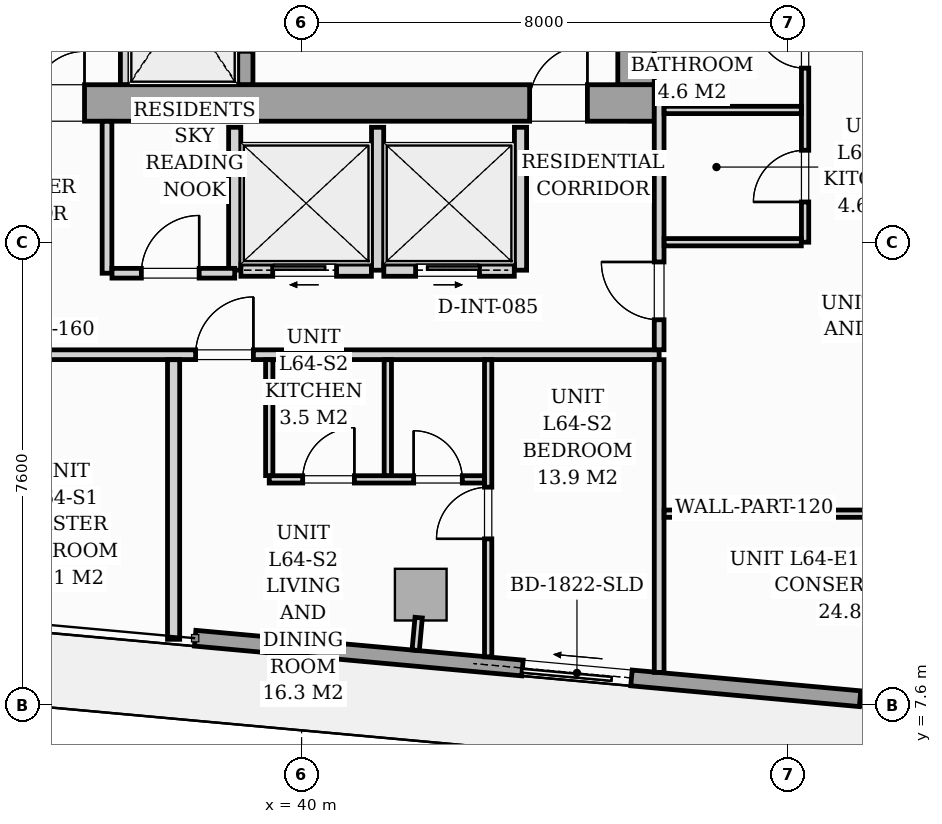
"""IFC4 building model, lengths in metres.
Left out: names, types, materials, properties, quantities, classifications, styles, units other than length and angle.
Written with IfcOpenShell. Run it as: python <this file> out.ifc"""

import sys

from ifc_helpers import new_model, si_unit, direction, frame, frame_2d, origin, origin_2d, place, context, subcontext, project, spatial, rectangle, i_section, extrude, source, transform, mapped, element, fill, save


model = new_model("IFC4")
c1 = context("Model", 3, precision=1e-05, world=origin(), true_north=direction((0.0, 1.0)))
c2 = subcontext(c1, "Body", "Model", "MODEL_VIEW")
j1 = project(units=[si_unit("LENGTHUNIT", "METRE"), si_unit("PLANEANGLEUNIT", "RADIAN")], contexts=[c1])
p1 = place(None, origin())
s1 = spatial("IfcSite", under=j1, at=p1, CompositionType="ELEMENT")
p2 = place(p1, origin())
s2 = spatial("IfcBuilding", under=s1, at=p2, CompositionType="ELEMENT")
p3 = place(p2, frame((0.0, 0.0, 223.2)))
s3 = spatial("IfcBuildingStorey", under=s2, at=p3, CompositionType="ELEMENT", Elevation=223.2)
m1 = source(origin(), c2, "Body", "SweptSolid", [
    extrude(i_section(OverallWidth=0.409, OverallDepth=0.425, WebThickness=0.033, FlangeThickness=0.052, FilletRadius=0.018, at=origin_2d()), origin(), (0.0, 0.0, 1.0), 3.296),
])
for number, where, z_axis, x_axis in (
    (1, (38.88, 17.4, 0.002), (0.0, 0.0, 1.0), (1.0, 0.0, 0.0)),
    (2, (45.6, 17.4, 0.002), (0.0, 0.0, 1.0), (1.0, 0.0, 0.0)),
):
    element("IfcColumn", number, at=place(p3, frame(where, z_axis=z_axis, x_axis=x_axis)), inside=s3, PredefinedType="PILASTER", context=c2, shape_type="MappedRepresentation", body=[
        mapped(m1, transform((0.0, 0.0, 0.0), scale=1.0)),
    ])
m2 = source(origin(), c2, "Body", "SweptSolid", [
    extrude(rectangle(XDim=0.85, YDim=0.85, at=origin_2d()), origin(), (0.0, 0.0, 1.0), 3.296),
])
p4 = place(p3, frame((41.96, 9.415, 0.002), z_axis=(0.0, 0.0, 1.0), x_axis=(0.995884398616, -0.090632580198, 0.0)))
e3 = element("IfcColumn", 3, at=p4, inside=s3, PredefinedType="COLUMN", context=c2, shape_type="MappedRepresentation", body=[
    mapped(m2, transform((0.0, 0.0, 0.0), scale=1.0)),
])
p5 = place(p3, frame((52.819, 7.372, 0.0), z_axis=(0.0, 0.0, 1.0), x_axis=(-0.995884447498, 0.090632043071, 0.0)))
e4 = element("IfcWall", 4, at=p5, inside=s3, PredefinedType="STANDARD", context=c2, shape_type="SweptSolid", body=[
    extrude(rectangle(XDim=14.63, YDim=0.26, at=frame_2d((7.315, 0.0))), origin(), (0.0, 0.0, 1.0), 3.04),
])
p6 = place(p5, frame((7.425, 0.0, 0.0)))
e5 = element("IfcOpeningElement", 5, at=p6, cuts=e4, PredefinedType="OPENING", context=c2, shape_type="SweptSolid", body=[
    extrude(rectangle(XDim=1.8, YDim=2.06, at=frame_2d((0.9, 1.03))), frame((0.0, 0.14, 0.0), z_axis=(0.0, -1.0, 0.0), x_axis=(1.0, 0.0, 0.0)), (0.0, 0.0, 1.0), 0.28),
])
p7 = place(p5, frame((2.05, 0.0, 0.65)))
e6 = element("IfcOpeningElement", 6, at=p7, cuts=e4, PredefinedType="OPENING", context=c2, shape_type="SweptSolid", body=[
    extrude(rectangle(XDim=1.6, YDim=1.5, at=frame_2d((0.8, 0.75))), frame((0.0, 0.14, 0.0), z_axis=(0.0, -1.0, 0.0), x_axis=(1.0, 0.0, 0.0)), (0.0, 0.0, 1.0), 0.28),
])
p8 = place(p3, frame((26.2, 17.5, 0.0), z_axis=(0.0, 0.0, 1.0), x_axis=(1.0, 0.0, 0.0)))
e7 = element("IfcWall", 7, at=p8, inside=s3, PredefinedType="SHEAR", context=c2, shape_type="SweptSolid", body=[
    extrude(rectangle(XDim=19.6, YDim=0.6, at=frame_2d((9.8, 0.0))), origin(), (0.0, 0.0, 1.0), 3.3),
])
p9 = place(p8, frame((0.95, 0.0, 0.0)))
e8 = element("IfcOpeningElement", 8, at=p9, cuts=e7, PredefinedType="OPENING", context=c2, shape_type="SweptSolid", body=[
    extrude(rectangle(XDim=0.95, YDim=2.06, at=frame_2d((0.475, 1.03))), frame((0.0, 0.31, 0.0), z_axis=(0.0, -1.0, 0.0), x_axis=(1.0, 0.0, 0.0)), (0.0, 0.0, 1.0), 0.62),
])
p10 = place(p8, frame((9.38, 0.0, 0.0)))
e9 = element("IfcOpeningElement", 9, at=p10, cuts=e7, PredefinedType="OPENING", context=c2, shape_type="SweptSolid", body=[
    extrude(rectangle(XDim=0.85, YDim=2.0, at=frame_2d((0.425, 1.0))), frame((0.0, 0.31, 0.0), z_axis=(0.0, -1.0, 0.0), x_axis=(1.0, 0.0, 0.0)), (0.0, 0.0, 1.0), 0.62),
])
p11 = place(p8, frame((17.55, 0.0, 0.0)))
e10 = element("IfcOpeningElement", 10, at=p11, cuts=e7, PredefinedType="OPENING", context=c2, shape_type="SweptSolid", body=[
    extrude(rectangle(XDim=0.95, YDim=2.06, at=frame_2d((0.475, 1.03))), frame((0.0, 0.31, 0.0), z_axis=(0.0, -1.0, 0.0), x_axis=(1.0, 0.0, 0.0)), (0.0, 0.0, 1.0), 0.62),
])
p12 = place(p3, frame((45.5, 17.802, 0.0), z_axis=(0.0, 0.0, 1.0), x_axis=(0.0, 1.0, 0.0)))
e11 = element("IfcWall", 11, at=p12, inside=s3, PredefinedType="SHEAR", context=c2, shape_type="SweptSolid", body=[
    extrude(rectangle(XDim=5.796, YDim=0.6, at=frame_2d((2.898, 0.0))), origin(), (0.0, 0.0, 1.0), 3.3),
])
p13 = place(p3, frame((37.1, 17.802, 0.0), z_axis=(0.0, 0.0, 1.0), x_axis=(0.0, 1.0, 0.0)))
e12 = element("IfcWall", 12, at=p13, inside=s3, PredefinedType="PARTITIONING", context=c2, shape_type="SweptSolid", body=[
    extrude(rectangle(XDim=2.646, YDim=0.16, at=frame_2d((1.323, 0.0))), origin(), (0.0, 0.0, 1.0), 3.04),
])
p14 = place(p3, frame((39.075, 17.802, 0.0), z_axis=(0.0, 0.0, 1.0), x_axis=(0.0, 1.0, 0.0)))
e13 = element("IfcWall", 13, at=p14, inside=s3, PredefinedType="SOLIDWALL", context=c2, shape_type="SweptSolid", body=[
    extrude(rectangle(XDim=2.646, YDim=0.25, at=frame_2d((1.323, 0.0))), origin(), (0.0, 0.0, 1.0), 3.3),
])
p15 = place(p14, frame((0.548, 0.0, 0.0)))
e14 = element("IfcOpeningElement", 14, at=p15, cuts=e13, PredefinedType="OPENING", context=c2, shape_type="SweptSolid", body=[
    extrude(rectangle(XDim=1.1, YDim=2.08, at=frame_2d((0.55, 1.04))), frame((0.0, 0.135, 0.0), z_axis=(0.0, -1.0, 0.0), x_axis=(1.0, 0.0, 0.0)), (0.0, 0.0, 1.0), 0.27),
])
for number, where, z_axis, x_axis in (
    (15, (38.9, 14.75, 0.0), (0.0, 0.0, 1.0), (0.0, 1.0, 0.0)),
    (16, (41.25, 14.75, 0.0), (0.0, 0.0, 1.0), (0.0, 1.0, 0.0)),
    (17, (43.6, 14.75, 0.0), (0.0, 0.0, 1.0), (0.0, 1.0, 0.0)),
):
    element("IfcWall", number, at=place(p3, frame(where, z_axis=z_axis, x_axis=x_axis)), inside=s3, PredefinedType="PARTITIONING", context=c2, shape_type="SweptSolid", body=[
        extrude(rectangle(XDim=2.35, YDim=0.2, at=frame_2d((1.175, 0.0))), origin(), (0.0, 0.0, 1.0), 3.04),
    ])
p16 = place(p3, frame((39.002, 14.75, 0.0), z_axis=(0.0, 0.0, 1.0), x_axis=(1.0, 0.0, 0.0)))
e18 = element("IfcWall", 18, at=p16, inside=s3, PredefinedType="PARTITIONING", context=c2, shape_type="SweptSolid", body=[
    extrude(rectangle(XDim=2.146, YDim=0.2, at=frame_2d((1.073, 0.0))), origin(), (0.0, 0.0, 1.0), 3.04),
])
p17 = place(p16, frame((0.523, 0.0, 0.0)))
e19 = element("IfcOpeningElement", 19, at=p17, cuts=e18, PredefinedType="OPENING", context=c2, shape_type="SweptSolid", body=[
    extrude(rectangle(XDim=1.05, YDim=2.08, at=frame_2d((0.525, 1.04))), frame((0.0, 0.11, 0.0), z_axis=(0.0, -1.0, 0.0), x_axis=(1.0, 0.0, 0.0)), (0.0, 0.0, 1.0), 0.22),
])
p18 = place(p3, frame((41.352, 14.75, 0.0), z_axis=(0.0, 0.0, 1.0), x_axis=(1.0, 0.0, 0.0)))
e20 = element("IfcWall", 20, at=p18, inside=s3, PredefinedType="PARTITIONING", context=c2, shape_type="SweptSolid", body=[
    extrude(rectangle(XDim=2.146, YDim=0.2, at=frame_2d((1.073, 0.0))), origin(), (0.0, 0.0, 1.0), 3.04),
])
p19 = place(p18, frame((0.523, 0.0, 0.0)))
e21 = element("IfcOpeningElement", 21, at=p19, cuts=e20, PredefinedType="OPENING", context=c2, shape_type="SweptSolid", body=[
    extrude(rectangle(XDim=1.05, YDim=2.08, at=frame_2d((0.525, 1.04))), frame((0.0, 0.11, 0.0), z_axis=(0.0, -1.0, 0.0), x_axis=(1.0, 0.0, 0.0)), (0.0, 0.0, 1.0), 0.22),
])
p20 = place(p3, frame((24.55, 13.36, 0.0), z_axis=(0.0, 0.0, 1.0), x_axis=(1.0, 0.0, 0.0)))
e22 = element("IfcWall", 22, at=p20, inside=s3, PredefinedType="PARTITIONING", context=c2, shape_type="SweptSolid", body=[
    extrude(rectangle(XDim=21.33, YDim=0.16, at=frame_2d((10.665, 0.0))), origin(), (0.0, 0.0, 1.0), 2.596),
])
p21 = place(p20, frame((2.37, 0.0, 0.0)))
e23 = element("IfcOpeningElement", 23, at=p21, cuts=e22, PredefinedType="OPENING", context=c2, shape_type="SweptSolid", body=[
    extrude(rectangle(XDim=0.95, YDim=2.06, at=frame_2d((0.475, 1.03))), frame((0.0, 0.09, 0.0), z_axis=(0.0, -1.0, 0.0), x_axis=(1.0, 0.0, 0.0)), (0.0, 0.0, 1.0), 0.18),
])
p22 = place(p20, frame((13.707, 0.0, 0.0)))
e24 = element("IfcOpeningElement", 24, at=p22, cuts=e22, PredefinedType="OPENING", context=c2, shape_type="SweptSolid", body=[
    extrude(rectangle(XDim=0.95, YDim=2.06, at=frame_2d((0.475, 1.03))), frame((0.0, 0.09, 0.0), z_axis=(0.0, -1.0, 0.0), x_axis=(1.0, 0.0, 0.0)), (0.0, 0.0, 1.0), 0.18),
])
p23 = place(p3, frame((45.88, 8.136, 0.0), z_axis=(0.0, 0.0, 1.0), x_axis=(0.0, 1.0, 0.0)))
e25 = element("IfcWall", 25, at=p23, inside=s3, PredefinedType="PARTITIONING", context=c2, shape_type="SweptSolid", body=[
    extrude(rectangle(XDim=5.142, YDim=0.16, at=frame_2d((2.571, 0.0))), origin(), (0.0, 0.0, 1.0), 3.04),
])
p24 = place(p3, frame((45.88, 13.442, 0.0), z_axis=(0.0, 0.0, 1.0), x_axis=(0.0, 1.0, 0.0)))
e26 = element("IfcWall", 26, at=p24, inside=s3, PredefinedType="PARTITIONING", context=c2, shape_type="SweptSolid", body=[
    extrude(rectangle(XDim=4.36, YDim=0.16, at=frame_2d((2.18, 0.0))), origin(), (0.0, 0.0, 1.0), 3.04),
])
p25 = place(p24, frame((0.493, 0.0, 0.0)))
e27 = element("IfcOpeningElement", 27, at=p25, cuts=e26, PredefinedType="OPENING", context=c2, shape_type="SweptSolid", body=[
    extrude(rectangle(XDim=0.95, YDim=2.06, at=frame_2d((0.475, 1.03))), frame((0.0, 0.09, 0.0), z_axis=(0.0, -1.0, 0.0), x_axis=(1.0, 0.0, 0.0)), (0.0, 0.0, 1.0), 0.18),
])
p26 = place(p3, frame((37.895, 8.68, 0.0), z_axis=(0.0, 0.0, 1.0), x_axis=(0.0, 1.0, 0.0)))
e28 = element("IfcWall", 28, at=p26, inside=s3, PredefinedType="PARTITIONING", context=c2, shape_type="SweptSolid", body=[
    extrude(rectangle(XDim=4.598, YDim=0.2, at=frame_2d((2.299, 0.0))), origin(), (0.0, 0.0, 1.0), 3.04),
])
p27 = place(p3, frame((43.068, 8.392, 0.0), z_axis=(0.0, 0.0, 1.0), x_axis=(0.0, 1.0, 0.0)))
e29 = element("IfcWall", 29, at=p27, inside=s3, PredefinedType="PARTITIONING", context=c2, shape_type="SweptSolid", body=[
    extrude(rectangle(XDim=4.886, YDim=0.12, at=frame_2d((2.443, 0.0))), origin(), (0.0, 0.0, 1.0), 3.04),
])
p28 = place(p27, frame((1.94, 0.0, 0.0)))
e30 = element("IfcOpeningElement", 30, at=p28, cuts=e29, PredefinedType="OPENING", context=c2, shape_type="SweptSolid", body=[
    extrude(rectangle(XDim=0.85, YDim=2.05, at=frame_2d((0.425, 1.025))), frame((0.0, 0.07, 0.0), z_axis=(0.0, -1.0, 0.0), x_axis=(1.0, 0.0, 0.0)), (0.0, 0.0, 1.0), 0.14),
])
p29 = place(p3, frame((39.468, 11.31, 0.0), z_axis=(0.0, 0.0, 1.0), x_axis=(1.0, 0.0, 0.0)))
e31 = element("IfcWall", 31, at=p29, inside=s3, PredefinedType="PARTITIONING", context=c2, shape_type="SweptSolid", body=[
    extrude(rectangle(XDim=3.538, YDim=0.12, at=frame_2d((1.769, 0.0))), origin(), (0.0, 0.0, 1.0), 3.04),
])
p30 = place(p29, frame((0.55, 0.0, 0.0)))
e32 = element("IfcOpeningElement", 32, at=p30, cuts=e31, PredefinedType="OPENING", context=c2, shape_type="SweptSolid", body=[
    extrude(rectangle(XDim=0.85, YDim=2.05, at=frame_2d((0.425, 1.025))), frame((0.0, 0.07, 0.0), z_axis=(0.0, -1.0, 0.0), x_axis=(1.0, 0.0, 0.0)), (0.0, 0.0, 1.0), 0.14),
])
p31 = place(p29, frame((2.375, 0.0, 0.0)))
e33 = element("IfcOpeningElement", 33, at=p31, cuts=e31, PredefinedType="OPENING", context=c2, shape_type="SweptSolid", body=[
    extrude(rectangle(XDim=0.8, YDim=2.02, at=frame_2d((0.4, 1.01))), frame((0.0, 0.07, 0.0), z_axis=(0.0, -1.0, 0.0), x_axis=(1.0, 0.0, 0.0)), (0.0, 0.0, 1.0), 0.14),
])
for number, where, z_axis, x_axis in (
    (34, (39.468, 11.372, 0.0), (0.0, 0.0, 1.0), (0.0, 1.0, 0.0)),
    (35, (41.418, 11.372, 0.0), (0.0, 0.0, 1.0), (0.0, 1.0, 0.0)),
):
    element("IfcWall", number, at=place(p3, frame(where, z_axis=z_axis, x_axis=x_axis)), inside=s3, PredefinedType="PARTITIONING", context=c2, shape_type="SweptSolid", body=[
        extrude(rectangle(XDim=1.906, YDim=0.12, at=frame_2d((0.953, 0.0))), origin(), (0.0, 0.0, 1.0), 3.04),
    ])
p32 = place(p3, frame((48.28, 15.21, 0.0), z_axis=(0.0, 0.0, 1.0), x_axis=(0.0, 1.0, 0.0)))
e36 = element("IfcWall", 36, at=p32, inside=s3, PredefinedType="PARTITIONING", context=c2, shape_type="SweptSolid", body=[
    extrude(rectangle(XDim=4.35, YDim=0.12, at=frame_2d((2.175, 0.0))), origin(), (0.0, 0.0, 1.0), 3.04),
])
p33 = place(p32, frame((0.662, 0.0, 0.0)))
e37 = element("IfcOpeningElement", 37, at=p33, cuts=e36, PredefinedType="OPENING", context=c2, shape_type="SweptSolid", body=[
    extrude(rectangle(XDim=0.85, YDim=2.05, at=frame_2d((0.425, 1.025))), frame((0.0, 0.07, 0.0), z_axis=(0.0, -1.0, 0.0), x_axis=(1.0, 0.0, 0.0)), (0.0, 0.0, 1.0), 0.14),
])
p34 = place(p32, frame((2.863, 0.0, 0.0)))
e38 = element("IfcOpeningElement", 38, at=p34, cuts=e36, PredefinedType="OPENING", context=c2, shape_type="SweptSolid", body=[
    extrude(rectangle(XDim=0.8, YDim=2.02, at=frame_2d((0.4, 1.01))), frame((0.0, 0.07, 0.0), z_axis=(0.0, -1.0, 0.0), x_axis=(1.0, 0.0, 0.0)), (0.0, 0.0, 1.0), 0.14),
])
p35 = place(p3, frame((45.962, 17.385, 0.0), z_axis=(0.0, 0.0, 1.0), x_axis=(1.0, 0.0, 0.0)))
e39 = element("IfcWall", 39, at=p35, inside=s3, PredefinedType="PARTITIONING", context=c2, shape_type="SweptSolid", body=[
    extrude(rectangle(XDim=2.256, YDim=0.12, at=frame_2d((1.128, 0.0))), origin(), (0.0, 0.0, 1.0), 2.381),
])
p36 = place(p3, frame((45.962, 15.21, 0.0), z_axis=(0.0, 0.0, 1.0), x_axis=(1.0, 0.0, 0.0)))
e40 = element("IfcWall", 40, at=p36, inside=s3, PredefinedType="PARTITIONING", context=c2, shape_type="SweptSolid", body=[
    extrude(rectangle(XDim=2.256, YDim=0.12, at=frame_2d((1.128, 0.0))), origin(), (0.0, 0.0, 1.0), 3.04),
])
p37 = place(p3, frame((45.962, 10.746, 0.0), z_axis=(0.0, 0.0, 1.0), x_axis=(1.0, 0.0, 0.0)))
e41 = element("IfcWall", 41, at=p37, inside=s3, PredefinedType="PARTITIONING", context=c2, shape_type="SweptSolid", body=[
    extrude(rectangle(XDim=9.594, YDim=0.12, at=frame_2d((4.797, 0.0))), origin(), (0.0, 0.0, 1.0), 3.04),
])
p38 = place(p37, frame((4.378, 0.0, 0.0)))
e42 = element("IfcOpeningElement", 42, at=p38, cuts=e41, PredefinedType="OPENING", context=c2, shape_type="SweptSolid", body=[
    extrude(rectangle(XDim=0.85, YDim=2.05, at=frame_2d((0.425, 1.025))), frame((0.0, 0.07, 0.0), z_axis=(0.0, -1.0, 0.0), x_axis=(1.0, 0.0, 0.0)), (0.0, 0.0, 1.0), 0.14),
])
p39 = place(p3, frame((36.8, 14.7, 0.0), z_axis=(0.0, 0.0, 1.0), x_axis=(0.0, 1.0, 0.0)))
e43 = element("IfcWall", 43, at=p39, inside=s3, PredefinedType="PARTITIONING", context=c2, shape_type="SweptSolid", body=[
    extrude(rectangle(XDim=2.498, YDim=0.16, at=frame_2d((1.249, 0.0))), origin(), (0.0, 0.0, 1.0), 3.04),
])
p40 = place(p3, frame((36.882, 14.7, 0.0), z_axis=(0.0, 0.0, 1.0), x_axis=(1.0, 0.0, 0.0)))
e44 = element("IfcWall", 44, at=p40, inside=s3, PredefinedType="PARTITIONING", context=c2, shape_type="SweptSolid", body=[
    extrude(rectangle(XDim=2.018, YDim=0.16, at=frame_2d((1.009, 0.0))), origin(), (0.0, 0.0, 1.0), 3.04),
])
p41 = place(p40, frame((0.483, 0.0, 0.0)))
e45 = element("IfcOpeningElement", 45, at=p41, cuts=e44, PredefinedType="OPENING", context=c2, shape_type="SweptSolid", body=[
    extrude(rectangle(XDim=0.95, YDim=2.06, at=frame_2d((0.475, 1.03))), frame((0.0, 0.09, 0.0), z_axis=(0.0, -1.0, 0.0), x_axis=(1.0, 0.0, 0.0)), (0.0, 0.0, 1.0), 0.18),
])
p42 = place(p3, frame((41.925, 9.036, 0.0), z_axis=(0.0, 0.0, 1.0), x_axis=(-0.090740281653, -0.995874591144, 0.0)))
e46 = element("IfcWall", 46, at=p42, inside=s3, PredefinedType="PARTITIONING", context=c2, shape_type="SweptSolid", body=[
    extrude(rectangle(XDim=0.538, YDim=0.12, at=frame_2d((0.269, 0.0))), origin(), (0.0, 0.0, 1.0), 3.04),
])
m3 = source(origin(), c2, "Body", "SweptSolid", [
    extrude(rectangle(XDim=1.8, YDim=2.06, at=frame_2d((0.9, 1.03))), frame((0.0, 0.025, 0.0), z_axis=(0.0, -1.0, 0.0), x_axis=(1.0, 0.0, 0.0)), (0.0, 0.0, 1.0), 0.05),
])
p43 = place(p6, origin())
e47 = element("IfcDoor", 47, at=p43, inside=s3, OperationType="SLIDING_TO_RIGHT", PredefinedType="DOOR", context=c2, shape_type="MappedRepresentation", body=[
    mapped(m3, transform((0.0, 0.0, 0.0), scale=1.0)),
])
fill(e5, e47)
m4 = source(origin(), c2, "Body", "SweptSolid", [
    extrude(rectangle(XDim=1.6, YDim=1.5, at=frame_2d((0.8, 0.75))), frame((0.0, 0.03, 0.0), z_axis=(0.0, -1.0, 0.0), x_axis=(1.0, 0.0, 0.0)), (0.0, 0.0, 1.0), 0.06),
])
p44 = place(p7, origin())
e48 = element("IfcWindow", 48, at=p44, inside=s3, PartitioningType="SINGLE_PANEL", PredefinedType="WINDOW", context=c2, shape_type="MappedRepresentation", body=[
    mapped(m4, transform((0.0, 0.0, 0.0), scale=1.0)),
])
fill(e6, e48)
m5 = source(origin(), c2, "Body", "SweptSolid", [
    extrude(rectangle(XDim=0.85, YDim=2.0, at=frame_2d((0.425, 1.0))), frame((0.0, 0.025, 0.0), z_axis=(0.0, -1.0, 0.0), x_axis=(1.0, 0.0, 0.0)), (0.0, 0.0, 1.0), 0.05),
])
p45 = place(p10, origin())
e49 = element("IfcDoor", 49, at=p45, inside=s3, OperationType="SINGLE_SWING_RIGHT", PredefinedType="DOOR", context=c2, shape_type="MappedRepresentation", body=[
    mapped(m5, transform((0.0, 0.0, 0.0), scale=1.0)),
])
fill(e9, e49)
m6 = source(origin(), c2, "Body", "SweptSolid", [
    extrude(rectangle(XDim=0.95, YDim=2.06, at=frame_2d((0.475, 1.03))), frame((0.0, 0.025, 0.0), z_axis=(0.0, -1.0, 0.0), x_axis=(1.0, 0.0, 0.0)), (0.0, 0.0, 1.0), 0.05),
])
p46 = place(p11, origin())
e50 = element("IfcDoor", 50, at=p46, inside=s3, OperationType="SINGLE_SWING_RIGHT", PredefinedType="DOOR", context=c2, shape_type="MappedRepresentation", body=[
    mapped(m6, transform((0.0, 0.0, 0.0), scale=1.0)),
])
fill(e10, e50)
m7 = source(origin(), c2, "Body", "SweptSolid", [
    extrude(rectangle(XDim=1.05, YDim=2.08, at=frame_2d((0.525, 1.04))), frame((0.0, 0.025, 0.0), z_axis=(0.0, -1.0, 0.0), x_axis=(1.0, 0.0, 0.0)), (0.0, 0.0, 1.0), 0.05),
])
p47 = place(p17, origin())
e51 = element("IfcDoor", 51, at=p47, inside=s3, OperationType="SLIDING_TO_LEFT", PredefinedType="DOOR", context=c2, shape_type="MappedRepresentation", body=[
    mapped(m7, transform((0.0, 0.0, 0.0), scale=1.0)),
])
fill(e19, e51)
p48 = place(p19, origin())
e52 = element("IfcDoor", 52, at=p48, inside=s3, OperationType="SLIDING_TO_RIGHT", PredefinedType="DOOR", context=c2, shape_type="MappedRepresentation", body=[
    mapped(m7, transform((0.0, 0.0, 0.0), scale=1.0)),
])
fill(e21, e52)
m8 = source(origin(), c2, "Body", "SweptSolid", [
    extrude(rectangle(XDim=0.95, YDim=2.06, at=frame_2d((0.475, 1.03))), frame((0.0, 0.025, 0.0), z_axis=(0.0, -1.0, 0.0), x_axis=(1.0, 0.0, 0.0)), (0.0, 0.0, 1.0), 0.05),
])
p49 = place(p22, origin())
e53 = element("IfcDoor", 53, at=p49, inside=s3, OperationType="SINGLE_SWING_RIGHT", PredefinedType="DOOR", context=c2, shape_type="MappedRepresentation", body=[
    mapped(m8, transform((0.0, 0.0, 0.0), scale=1.0)),
])
fill(e24, e53)
m9 = source(origin(), c2, "Body", "SweptSolid", [
    extrude(rectangle(XDim=0.85, YDim=2.05, at=frame_2d((0.425, 1.025))), frame((0.0, 0.025, 0.0), z_axis=(0.0, -1.0, 0.0), x_axis=(1.0, 0.0, 0.0)), (0.0, 0.0, 1.0), 0.05),
])
p50 = place(p28, origin())
e54 = element("IfcDoor", 54, at=p50, inside=s3, OperationType="SINGLE_SWING_LEFT", PredefinedType="DOOR", context=c2, shape_type="MappedRepresentation", body=[
    mapped(m9, transform((0.0, 0.0, 0.0), scale=1.0)),
])
fill(e30, e54)
p51 = place(p30, origin())
e55 = element("IfcDoor", 55, at=p51, inside=s3, OperationType="SINGLE_SWING_RIGHT", PredefinedType="DOOR", context=c2, shape_type="MappedRepresentation", body=[
    mapped(m9, transform((0.0, 0.0, 0.0), scale=1.0)),
])
fill(e32, e55)
m10 = source(origin(), c2, "Body", "SweptSolid", [
    extrude(rectangle(XDim=0.8, YDim=2.02, at=frame_2d((0.4, 1.01))), frame((0.0, 0.025, 0.0), z_axis=(0.0, -1.0, 0.0), x_axis=(1.0, 0.0, 0.0)), (0.0, 0.0, 1.0), 0.05),
])
p52 = place(p31, origin())
e56 = element("IfcDoor", 56, at=p52, inside=s3, OperationType="SINGLE_SWING_LEFT", PredefinedType="DOOR", context=c2, shape_type="MappedRepresentation", body=[
    mapped(m10, transform((0.0, 0.0, 0.0), scale=1.0)),
])
fill(e33, e56)
p53 = place(p25, origin())
e57 = element("IfcDoor", 57, at=p53, inside=s3, OperationType="SINGLE_SWING_RIGHT", PredefinedType="DOOR", context=c2, shape_type="MappedRepresentation", body=[
    mapped(m8, transform((0.0, 0.0, 0.0), scale=1.0)),
])
fill(e27, e57)
p54 = place(p33, origin())
e58 = element("IfcDoor", 58, at=p54, inside=s3, OperationType="SINGLE_SWING_LEFT", PredefinedType="DOOR", context=c2, shape_type="MappedRepresentation", body=[
    mapped(m9, transform((0.0, 0.0, 0.0), scale=1.0)),
])
fill(e37, e58)
p55 = place(p34, origin())
e59 = element("IfcDoor", 59, at=p55, inside=s3, OperationType="SINGLE_SWING_RIGHT", PredefinedType="DOOR", context=c2, shape_type="MappedRepresentation", body=[
    mapped(m10, transform((0.0, 0.0, 0.0), scale=1.0)),
])
fill(e38, e59)
p56 = place(p41, origin())
e60 = element("IfcDoor", 60, at=p56, inside=s3, OperationType="SINGLE_SWING_RIGHT", PredefinedType="DOOR", context=c2, shape_type="MappedRepresentation", body=[
    mapped(m8, transform((0.0, 0.0, 0.0), scale=1.0)),
])
fill(e45, e60)
save(model, sys.argv[1])
